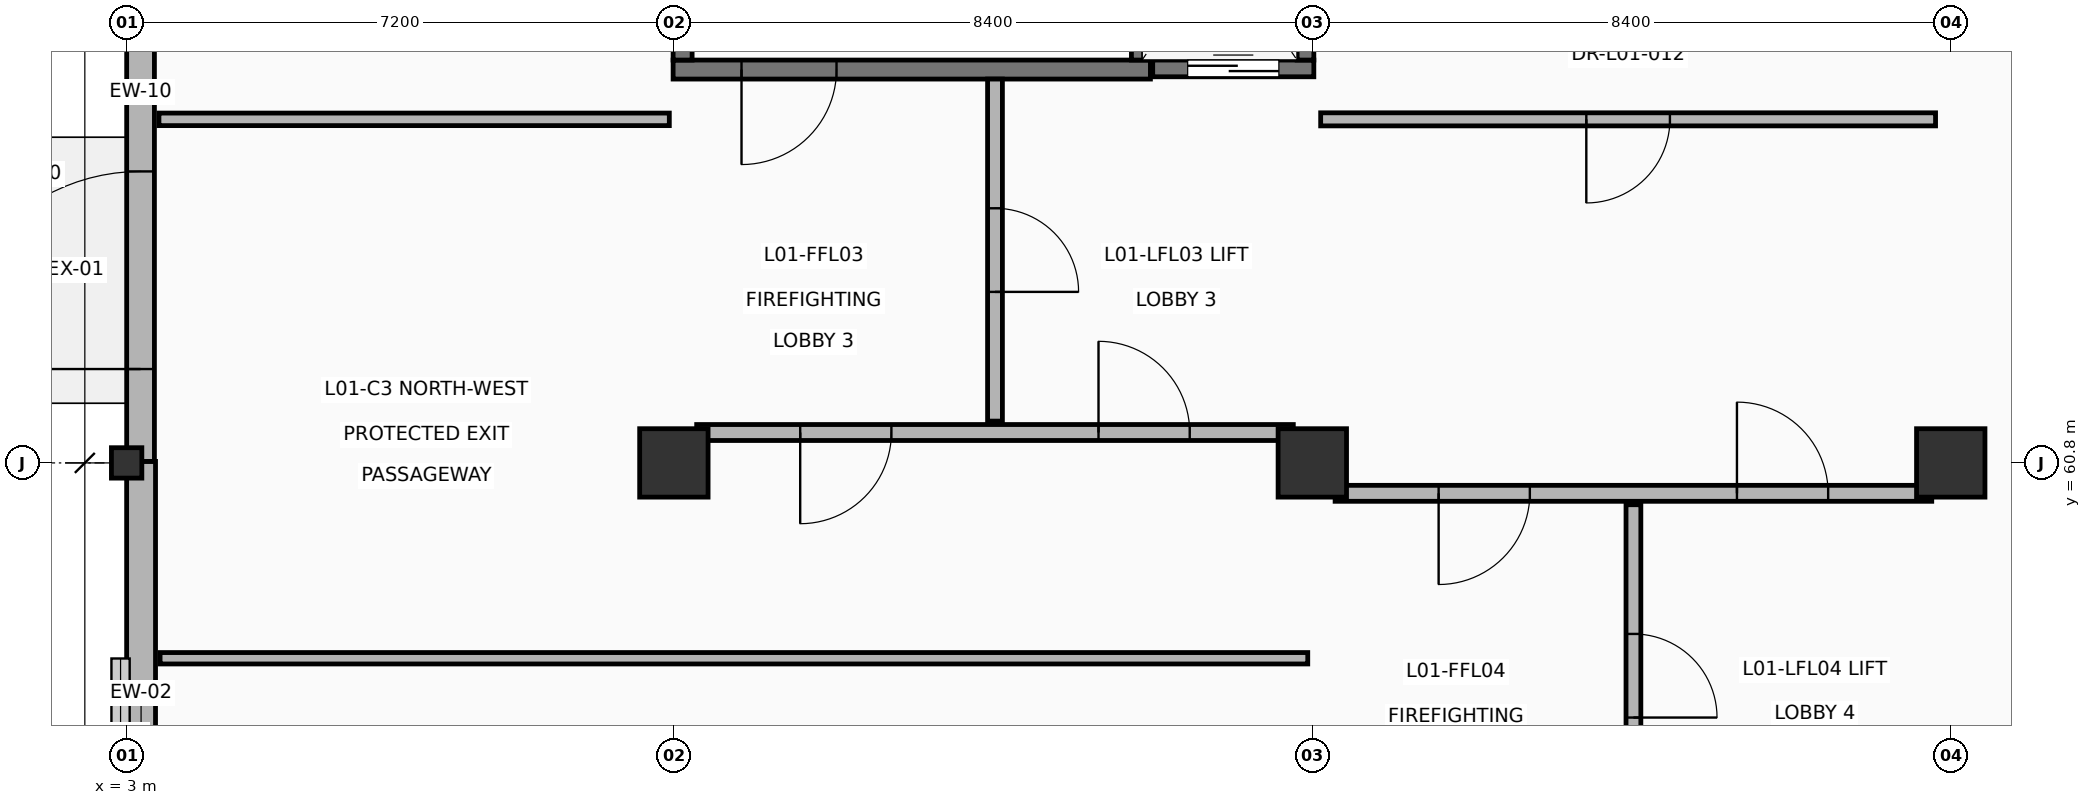
"""IFC4 building model, lengths in metres.
Left out: names, types, materials, properties, quantities, classifications, styles, units other than length and angle.
Written with IfcOpenShell. Run it as: python <this file> out.ifc"""

import sys

from ifc_helpers import new_model, si_unit, direction, frame, frame_2d, origin, origin_2d, place, context, subcontext, project, spatial, rectangle, hollow_rectangle, extrude, element, fill, save


model = new_model("IFC4")
c1 = context("Model", 3, precision=1e-05, world=origin(), true_north=direction((0.0, 1.0)))
c2 = subcontext(c1, "Body", "Model", "MODEL_VIEW")
j1 = project(units=[si_unit("LENGTHUNIT", "METRE"), si_unit("PLANEANGLEUNIT", "RADIAN")], contexts=[c1])
p1 = place(None, origin())
s1 = spatial("IfcSite", under=j1, at=p1, CompositionType="ELEMENT")
p2 = place(p1, origin())
s2 = spatial("IfcBuilding", under=s1, at=p2, CompositionType="ELEMENT")
p3 = place(p2, origin())
s3 = spatial("IfcBuildingStorey", under=s2, at=p3, CompositionType="ELEMENT", Elevation=0.0)
p4 = place(p3, frame((3.0, 60.8, 0.0), z_axis=(0.0, 0.0, 1.0), x_axis=(1.0, 0.0, 0.0)))
e1 = element("IfcColumn", 1, at=p4, inside=s3, PredefinedType="COLUMN", context=c2, shape_type="SweptSolid", body=[
    extrude(hollow_rectangle(XDim=0.4, YDim=0.4, WallThickness=0.016, at=origin_2d()), origin(), (0.0, 0.0, 1.0), 5.4),
])
for number, where, z_axis, x_axis in (
    (2, (10.2, 60.8, 0.0), (0.0, 0.0, 1.0), (1.0, 0.0, 0.0)),
    (3, (18.6, 60.8, 0.0), (0.0, 0.0, 1.0), (1.0, 0.0, 0.0)),
    (4, (27.0, 60.8, 0.0), (0.0, 0.0, 1.0), (1.0, 0.0, 0.0)),
):
    element("IfcColumn", number, at=place(p3, frame(where, z_axis=z_axis, x_axis=x_axis)), inside=s3, PredefinedType="COLUMN", context=c2, shape_type="SweptSolid", body=[
        extrude(rectangle(XDim=0.9, YDim=0.9, at=origin_2d()), origin(), (0.0, 0.0, 1.0), 5.4),
    ])
p5 = place(p3, frame((3.19, 53.635, 0.0), z_axis=(0.0, 0.0, 1.0), x_axis=(0.0, 1.0, 0.0)))
e5 = element("IfcWall", 5, at=p5, inside=s3, PredefinedType="SOLIDWALL", context=c2, shape_type="SweptSolid", body=[
    extrude(rectangle(XDim=7.185, YDim=0.38, at=frame_2d((3.593, 0.0))), origin(), (0.0, 0.0, 1.0), 4.462),
])
p6 = place(p3, frame((3.183, 60.82, 0.0), z_axis=(0.0, 0.0, 1.0), x_axis=(0.0, 1.0, 0.0)))
e6 = element("IfcWall", 6, at=p6, inside=s3, PredefinedType="SOLIDWALL", context=c2, shape_type="SweptSolid", body=[
    extrude(rectangle(XDim=7.145, YDim=0.365, at=frame_2d((3.573, 0.0))), origin(), (0.0, 0.0, 1.0), 4.462),
])
p7 = place(p6, frame((1.215, 0.0, 0.0)))
e7 = element("IfcOpeningElement", 7, at=p7, cuts=e6, PredefinedType="OPENING", context=c2, shape_type="SweptSolid", body=[
    extrude(rectangle(XDim=2.6, YDim=2.6, at=frame_2d((1.3, 1.3))), frame((0.0, 0.192, 0.0), z_axis=(0.0, -1.0, 0.0), x_axis=(1.0, 0.0, 0.0)), (0.0, 0.0, 1.0), 0.385),
])
p8 = place(p3, frame((10.19, 65.975, 0.0), z_axis=(0.0, 0.0, 1.0), x_axis=(1.0, 0.0, 0.0)))
e8 = element("IfcWall", 8, at=p8, inside=s3, PredefinedType="SHEAR", context=c2, shape_type="SweptSolid", body=[
    extrude(rectangle(XDim=6.28, YDim=0.25, at=frame_2d((3.14, 0.0))), origin(), (0.0, 0.0, 1.0), 5.16),
])
p9 = place(p8, frame((0.9, 0.0, 0.0)))
e9 = element("IfcOpeningElement", 9, at=p9, cuts=e8, PredefinedType="OPENING", context=c2, shape_type="SweptSolid", body=[
    extrude(rectangle(XDim=1.25, YDim=2.2, at=frame_2d((0.625, 1.1))), frame((0.0, 0.135, 0.0), z_axis=(0.0, -1.0, 0.0), x_axis=(1.0, 0.0, 0.0)), (0.0, 0.0, 1.0), 0.27),
])
for number, where, z_axis, x_axis in (
    (10, (10.315, 66.1, 0.0), (0.0, 0.0, 1.0), (0.0, 1.0, 0.0)),
    (11, (16.345, 66.1, 0.0), (0.0, 0.0, 1.0), (0.0, 1.0, 0.0)),
):
    element("IfcWall", number, at=place(p3, frame(where, z_axis=z_axis, x_axis=x_axis)), inside=s3, PredefinedType="SHEAR", context=c2, shape_type="SweptSolid", body=[
        extrude(rectangle(XDim=9.5, YDim=0.25, at=frame_2d((4.75, 0.0))), origin(), (0.0, 0.0, 1.0), 5.16),
    ])
p10 = place(p3, frame((16.5, 65.99, 0.0), z_axis=(0.0, 0.0, 1.0), x_axis=(1.0, 0.0, 0.0)))
e12 = element("IfcWall", 12, at=p10, inside=s3, PredefinedType="SHEAR", context=c2, shape_type="SweptSolid", body=[
    extrude(rectangle(XDim=2.12, YDim=0.22, at=frame_2d((1.06, 0.0))), origin(), (0.0, 0.0, 1.0), 5.16),
])
p11 = place(p10, frame((0.46, 0.0, 0.0)))
e13 = element("IfcOpeningElement", 13, at=p11, cuts=e12, PredefinedType="OPENING", context=c2, shape_type="SweptSolid", body=[
    extrude(rectangle(XDim=1.2, YDim=2.2, at=frame_2d((0.6, 1.1))), frame((0.0, 0.12, 0.0), z_axis=(0.0, -1.0, 0.0), x_axis=(1.0, 0.0, 0.0)), (0.0, 0.0, 1.0), 0.24),
])
p12 = place(p3, frame((18.51, 66.1, 0.0), z_axis=(0.0, 0.0, 1.0), x_axis=(0.0, 1.0, 0.0)))
e14 = element("IfcWall", 14, at=p12, inside=s3, PredefinedType="SHEAR", context=c2, shape_type="SweptSolid", body=[
    extrude(rectangle(XDim=3.0, YDim=0.22, at=frame_2d((1.5, 0.0))), origin(), (0.0, 0.0, 1.0), 5.16),
])
p13 = place(p3, frame((10.5, 61.2, 0.0), z_axis=(0.0, 0.0, 1.0), x_axis=(1.0, 0.0, 0.0)))
e15 = element("IfcWall", 15, at=p13, inside=s3, PredefinedType="PARTITIONING", context=c2, shape_type="SweptSolid", body=[
    extrude(rectangle(XDim=7.85, YDim=0.21, at=frame_2d((3.925, 0.0))), origin(), (0.0, 0.0, 1.0), 5.16),
])
p14 = place(p13, frame((1.362, 0.0, 0.0)))
e16 = element("IfcOpeningElement", 16, at=p14, cuts=e15, PredefinedType="OPENING", context=c2, shape_type="SweptSolid", body=[
    extrude(rectangle(XDim=1.2, YDim=2.2, at=frame_2d((0.6, 1.1))), frame((0.0, 0.115, 0.0), z_axis=(0.0, -1.0, 0.0), x_axis=(1.0, 0.0, 0.0)), (0.0, 0.0, 1.0), 0.23),
])
p15 = place(p13, frame((5.287, 0.0, 0.0)))
e17 = element("IfcOpeningElement", 17, at=p15, cuts=e15, PredefinedType="OPENING", context=c2, shape_type="SweptSolid", body=[
    extrude(rectangle(XDim=1.2, YDim=2.2, at=frame_2d((0.6, 1.1))), frame((0.0, 0.115, 0.0), z_axis=(0.0, -1.0, 0.0), x_axis=(1.0, 0.0, 0.0)), (0.0, 0.0, 1.0), 0.23),
])
p16 = place(p3, frame((14.425, 61.35, 0.0), z_axis=(0.0, 0.0, 1.0), x_axis=(0.0, 1.0, 0.0)))
e18 = element("IfcWall", 18, at=p16, inside=s3, PredefinedType="PARTITIONING", context=c2, shape_type="SweptSolid", body=[
    extrude(rectangle(XDim=4.5, YDim=0.195, at=frame_2d((2.25, 0.0))), origin(), (0.0, 0.0, 1.0), 5.16),
])
p17 = place(p16, frame((1.7, 0.0, 0.0)))
e19 = element("IfcOpeningElement", 19, at=p17, cuts=e18, PredefinedType="OPENING", context=c2, shape_type="SweptSolid", body=[
    extrude(rectangle(XDim=1.1, YDim=2.15, at=frame_2d((0.55, 1.075))), frame((0.0, 0.107, 0.0), z_axis=(0.0, -1.0, 0.0), x_axis=(1.0, 0.0, 0.0)), (0.0, 0.0, 1.0), 0.215),
])
p18 = place(p3, frame((18.9, 60.4, 0.0), z_axis=(0.0, 0.0, 1.0), x_axis=(1.0, 0.0, 0.0)))
e20 = element("IfcWall", 20, at=p18, inside=s3, PredefinedType="PARTITIONING", context=c2, shape_type="SweptSolid", body=[
    extrude(rectangle(XDim=7.85, YDim=0.21, at=frame_2d((3.925, 0.0))), origin(), (0.0, 0.0, 1.0), 5.16),
])
p19 = place(p18, frame((1.362, 0.0, 0.0)))
e21 = element("IfcOpeningElement", 21, at=p19, cuts=e20, PredefinedType="OPENING", context=c2, shape_type="SweptSolid", body=[
    extrude(rectangle(XDim=1.2, YDim=2.2, at=frame_2d((0.6, 1.1))), frame((0.0, 0.115, 0.0), z_axis=(0.0, -1.0, 0.0), x_axis=(1.0, 0.0, 0.0)), (0.0, 0.0, 1.0), 0.23),
])
p20 = place(p18, frame((5.287, 0.0, 0.0)))
e22 = element("IfcOpeningElement", 22, at=p20, cuts=e20, PredefinedType="OPENING", context=c2, shape_type="SweptSolid", body=[
    extrude(rectangle(XDim=1.2, YDim=2.2, at=frame_2d((0.6, 1.1))), frame((0.0, 0.115, 0.0), z_axis=(0.0, -1.0, 0.0), x_axis=(1.0, 0.0, 0.0)), (0.0, 0.0, 1.0), 0.23),
])
p21 = place(p3, frame((22.825, 55.75, 0.0), z_axis=(0.0, 0.0, 1.0), x_axis=(0.0, 1.0, 0.0)))
e23 = element("IfcWall", 23, at=p21, inside=s3, PredefinedType="PARTITIONING", context=c2, shape_type="SweptSolid", body=[
    extrude(rectangle(XDim=4.5, YDim=0.195, at=frame_2d((2.25, 0.0))), origin(), (0.0, 0.0, 1.0), 5.16),
])
p22 = place(p21, frame((1.7, 0.0, 0.0)))
e24 = element("IfcOpeningElement", 24, at=p22, cuts=e23, PredefinedType="OPENING", context=c2, shape_type="SweptSolid", body=[
    extrude(rectangle(XDim=1.1, YDim=2.15, at=frame_2d((0.55, 1.075))), frame((0.0, 0.107, 0.0), z_axis=(0.0, -1.0, 0.0), x_axis=(1.0, 0.0, 0.0)), (0.0, 0.0, 1.0), 0.215),
])
p23 = place(p3, frame((18.71, 65.32, 0.0), z_axis=(0.0, 0.0, 1.0), x_axis=(1.0, 0.0, 0.0)))
e25 = element("IfcWall", 25, at=p23, inside=s3, PredefinedType="PARTITIONING", context=c2, shape_type="SweptSolid", body=[
    extrude(rectangle(XDim=8.09, YDim=0.172, at=frame_2d((4.045, 0.0))), origin(), (0.0, 0.0, 1.0), 4.462),
])
p24 = place(p23, frame((3.495, 0.0, 0.0)))
e26 = element("IfcOpeningElement", 26, at=p24, cuts=e25, PredefinedType="OPENING", context=c2, shape_type="SweptSolid", body=[
    extrude(rectangle(XDim=1.1, YDim=2.15, at=frame_2d((0.55, 1.075))), frame((0.0, 0.096, 0.0), z_axis=(0.0, -1.0, 0.0), x_axis=(1.0, 0.0, 0.0)), (0.0, 0.0, 1.0), 0.192),
])
p25 = place(p3, frame((3.425, 65.32, 0.0), z_axis=(0.0, 0.0, 1.0), x_axis=(1.0, 0.0, 0.0)))
e27 = element("IfcWall", 27, at=p25, inside=s3, PredefinedType="PARTITIONING", context=c2, shape_type="SweptSolid", body=[
    extrude(rectangle(XDim=6.715, YDim=0.165, at=frame_2d((3.357, 0.0))), origin(), (0.0, 0.0, 1.0), 4.462),
])
p26 = place(p3, frame((18.54, 58.23, 0.0), z_axis=(0.0, 0.0, 1.0), x_axis=(-1.0, 0.0, 0.0)))
e28 = element("IfcWall", 28, at=p26, inside=s3, PredefinedType="PARTITIONING", context=c2, shape_type="SweptSolid", body=[
    extrude(rectangle(XDim=15.1, YDim=0.15, at=frame_2d((7.55, 0.0))), origin(), (0.0, 0.0, 1.0), 4.462),
])
p27 = place(p7, origin())
e29 = element("IfcDoor", 29, at=p27, inside=s3, OperationType="DOUBLE_DOOR_SINGLE_SWING", PredefinedType="DOOR", context=c2, shape_type="SweptSolid", body=[
    extrude(rectangle(XDim=2.6, YDim=2.6, at=frame_2d((1.3, 1.3))), frame((0.0, 0.025, 0.0), z_axis=(0.0, -1.0, 0.0), x_axis=(1.0, 0.0, 0.0)), (0.0, 0.0, 1.0), 0.05),
])
fill(e7, e29)
p28 = place(p9, origin())
e30 = element("IfcDoor", 30, at=p28, inside=s3, OperationType="SINGLE_SWING_RIGHT", PredefinedType="DOOR", context=c2, shape_type="SweptSolid", body=[
    extrude(rectangle(XDim=1.25, YDim=2.2, at=frame_2d((0.625, 1.1))), frame((0.0, 0.025, 0.0), z_axis=(0.0, -1.0, 0.0), x_axis=(1.0, 0.0, 0.0)), (0.0, 0.0, 1.0), 0.05),
])
fill(e9, e30)
p29 = place(p11, origin())
e31 = element("IfcDoor", 31, at=p29, inside=s3, OperationType="DOUBLE_DOOR_SLIDING", PredefinedType="DOOR", context=c2, shape_type="SweptSolid", body=[
    extrude(rectangle(XDim=1.2, YDim=2.2, at=frame_2d((0.6, 1.1))), frame((0.0, 0.025, 0.0), z_axis=(0.0, -1.0, 0.0), x_axis=(1.0, 0.0, 0.0)), (0.0, 0.0, 1.0), 0.05),
])
fill(e13, e31)
p30 = place(p14, origin())
e32 = element("IfcDoor", 32, at=p30, inside=s3, OperationType="SINGLE_SWING_RIGHT", PredefinedType="DOOR", context=c2, shape_type="SweptSolid", body=[
    extrude(rectangle(XDim=1.2, YDim=2.2, at=frame_2d((0.6, 1.1))), frame((0.0, 0.025, 0.0), z_axis=(0.0, -1.0, 0.0), x_axis=(1.0, 0.0, 0.0)), (0.0, 0.0, 1.0), 0.05),
])
fill(e16, e32)
p31 = place(p15, origin())
e33 = element("IfcDoor", 33, at=p31, inside=s3, OperationType="SINGLE_SWING_LEFT", PredefinedType="DOOR", context=c2, shape_type="SweptSolid", body=[
    extrude(rectangle(XDim=1.2, YDim=2.2, at=frame_2d((0.6, 1.1))), frame((0.0, 0.025, 0.0), z_axis=(0.0, -1.0, 0.0), x_axis=(1.0, 0.0, 0.0)), (0.0, 0.0, 1.0), 0.05),
])
fill(e17, e33)
p32 = place(p17, origin())
e34 = element("IfcDoor", 34, at=p32, inside=s3, OperationType="SINGLE_SWING_RIGHT", PredefinedType="DOOR", context=c2, shape_type="SweptSolid", body=[
    extrude(rectangle(XDim=1.1, YDim=2.15, at=frame_2d((0.55, 1.075))), frame((0.0, 0.025, 0.0), z_axis=(0.0, -1.0, 0.0), x_axis=(1.0, 0.0, 0.0)), (0.0, 0.0, 1.0), 0.05),
])
fill(e19, e34)
p33 = place(p19, origin())
e35 = element("IfcDoor", 35, at=p33, inside=s3, OperationType="SINGLE_SWING_RIGHT", PredefinedType="DOOR", context=c2, shape_type="SweptSolid", body=[
    extrude(rectangle(XDim=1.2, YDim=2.2, at=frame_2d((0.6, 1.1))), frame((0.0, 0.025, 0.0), z_axis=(0.0, -1.0, 0.0), x_axis=(1.0, 0.0, 0.0)), (0.0, 0.0, 1.0), 0.05),
])
fill(e21, e35)
p34 = place(p20, origin())
e36 = element("IfcDoor", 36, at=p34, inside=s3, OperationType="SINGLE_SWING_LEFT", PredefinedType="DOOR", context=c2, shape_type="SweptSolid", body=[
    extrude(rectangle(XDim=1.2, YDim=2.2, at=frame_2d((0.6, 1.1))), frame((0.0, 0.025, 0.0), z_axis=(0.0, -1.0, 0.0), x_axis=(1.0, 0.0, 0.0)), (0.0, 0.0, 1.0), 0.05),
])
fill(e22, e36)
p35 = place(p22, origin())
e37 = element("IfcDoor", 37, at=p35, inside=s3, OperationType="SINGLE_SWING_RIGHT", PredefinedType="DOOR", context=c2, shape_type="SweptSolid", body=[
    extrude(rectangle(XDim=1.1, YDim=2.15, at=frame_2d((0.55, 1.075))), frame((0.0, 0.025, 0.0), z_axis=(0.0, -1.0, 0.0), x_axis=(1.0, 0.0, 0.0)), (0.0, 0.0, 1.0), 0.05),
])
fill(e24, e37)
p36 = place(p24, origin())
e38 = element("IfcDoor", 38, at=p36, inside=s3, OperationType="SINGLE_SWING_RIGHT", PredefinedType="DOOR", context=c2, shape_type="SweptSolid", body=[
    extrude(rectangle(XDim=1.1, YDim=2.15, at=frame_2d((0.55, 1.075))), frame((0.0, 0.025, 0.0), z_axis=(0.0, -1.0, 0.0), x_axis=(1.0, 0.0, 0.0)), (0.0, 0.0, 1.0), 0.05),
])
fill(e26, e38)
save(model, sys.argv[1])
